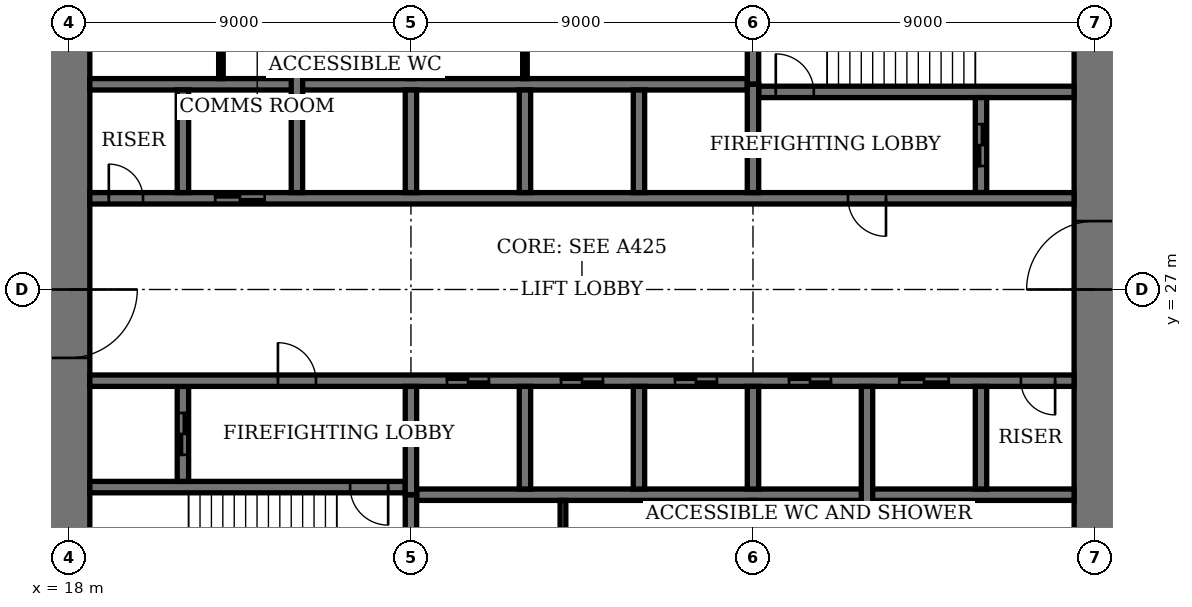
"""IFC4 building model, lengths in metres.
Left out: names, types, materials, properties, quantities, classifications, styles, units other than length and angle.
Written with IfcOpenShell. Run it as: python <this file> out.ifc"""

import sys

from ifc_helpers import new_model, si_unit, direction, frame, frame_2d, origin, place, context, subcontext, project, spatial, rectangle, extrude, element, fill, save


model = new_model("IFC4")
c1 = context("Model", 3, precision=1e-05, world=origin(), true_north=direction((0.0, 1.0)))
c2 = subcontext(c1, "Body", "Model", "MODEL_VIEW")
j1 = project(units=[si_unit("LENGTHUNIT", "METRE"), si_unit("PLANEANGLEUNIT", "RADIAN")], contexts=[c1])
p1 = place(None, origin())
s1 = spatial("IfcSite", under=j1, at=p1, CompositionType="ELEMENT")
p2 = place(p1, origin())
s2 = spatial("IfcBuilding", under=s1, at=p2, CompositionType="ELEMENT")
p3 = place(p2, frame((0.0, 0.0, 67.8)))
s3 = spatial("IfcBuildingStorey", under=s2, at=p3, CompositionType="ELEMENT", Elevation=67.8)
p4 = place(p3, frame((18.0, 35.45, 0.0), z_axis=(0.0, 0.0, 1.0), x_axis=(0.0, -1.0, 0.0)))
e1 = element("IfcWall", 1, at=p4, inside=s3, PredefinedType="SHEAR", context=c2, shape_type="SweptSolid", body=[
    extrude(rectangle(XDim=16.9, YDim=1.1, at=frame_2d((8.45, 0.0))), origin(), (0.0, 0.0, 1.0), 4.0),
])
p5 = place(p4, frame((8.45, 0.0, 0.0)))
e2 = element("IfcOpeningElement", 2, at=p5, cuts=e1, PredefinedType="OPENING", context=c2, shape_type="SweptSolid", body=[
    extrude(rectangle(XDim=1.8, YDim=2.4, at=frame_2d((0.9, 1.2))), frame((0.0, 0.56, 0.0), z_axis=(0.0, -1.0, 0.0), x_axis=(1.0, 0.0, 0.0)), (0.0, 0.0, 1.0), 1.12),
])
p6 = place(p3, frame((45.0, 18.55, 0.0), z_axis=(0.0, 0.0, 1.0), x_axis=(0.0, 1.0, 0.0)))
e3 = element("IfcWall", 3, at=p6, inside=s3, PredefinedType="SHEAR", context=c2, shape_type="SweptSolid", body=[
    extrude(rectangle(XDim=16.9, YDim=1.1, at=frame_2d((8.45, 0.0))), origin(), (0.0, 0.0, 1.0), 4.0),
])
p7 = place(p6, frame((8.45, 0.0, 0.0)))
e4 = element("IfcOpeningElement", 4, at=p7, cuts=e3, PredefinedType="OPENING", context=c2, shape_type="SweptSolid", body=[
    extrude(rectangle(XDim=1.8, YDim=2.4, at=frame_2d((0.9, 1.2))), frame((0.0, 0.56, 0.0), z_axis=(0.0, -1.0, 0.0), x_axis=(1.0, 0.0, 0.0)), (0.0, 0.0, 1.0), 1.12),
])
p8 = place(p3, frame((18.55, 21.8, 0.0), z_axis=(0.0, 0.0, 1.0), x_axis=(1.0, 0.0, 0.0)))
e5 = element("IfcWall", 5, at=p8, inside=s3, PredefinedType="SHEAR", context=c2, shape_type="SweptSolid", body=[
    extrude(rectangle(XDim=8.3, YDim=0.3, at=frame_2d((4.15, 0.0))), origin(), (0.0, 0.0, 1.0), 4.0),
])
p9 = place(p8, frame((6.85, 0.0, 0.0)))
e6 = element("IfcOpeningElement", 6, at=p9, cuts=e5, PredefinedType="OPENING", context=c2, shape_type="SweptSolid", body=[
    extrude(rectangle(XDim=1.0, YDim=2.4, at=frame_2d((0.5, 1.2))), frame((0.0, 0.16, 0.0), z_axis=(0.0, -1.0, 0.0), x_axis=(1.0, 0.0, 0.0)), (0.0, 0.0, 1.0), 0.32),
])
p10 = place(p3, frame((36.15, 32.2, 0.0), z_axis=(0.0, 0.0, 1.0), x_axis=(1.0, 0.0, 0.0)))
e7 = element("IfcWall", 7, at=p10, inside=s3, PredefinedType="SHEAR", context=c2, shape_type="SweptSolid", body=[
    extrude(rectangle(XDim=8.3, YDim=0.3, at=frame_2d((4.15, 0.0))), origin(), (0.0, 0.0, 1.0), 4.0),
])
p11 = place(p10, frame((0.45, 0.0, 0.0)))
e8 = element("IfcOpeningElement", 8, at=p11, cuts=e7, PredefinedType="OPENING", context=c2, shape_type="SweptSolid", body=[
    extrude(rectangle(XDim=1.0, YDim=2.4, at=frame_2d((0.5, 1.2))), frame((0.0, 0.16, 0.0), z_axis=(0.0, -1.0, 0.0), x_axis=(1.0, 0.0, 0.0)), (0.0, 0.0, 1.0), 0.32),
])
for number, where, z_axis, x_axis in (
    (9, (27.0, 18.55, 0.0), (0.0, 0.0, 1.0), (0.0, 1.0, 0.0)),
    (10, (36.0, 32.4, 0.0), (0.0, 0.0, 1.0), (0.0, 1.0, 0.0)),
):
    element("IfcWall", number, at=place(p3, frame(where, z_axis=z_axis, x_axis=x_axis)), inside=s3, PredefinedType="SHEAR", context=c2, shape_type="SweptSolid", body=[
        extrude(rectangle(XDim=3.05, YDim=0.3, at=frame_2d((1.525, 0.0))), origin(), (0.0, 0.0, 1.0), 4.0),
    ])
p12 = place(p3, frame((21.0, 21.95, 0.0), z_axis=(0.0, 0.0, 1.0), x_axis=(0.0, 1.0, 0.0)))
e11 = element("IfcWall", 11, at=p12, inside=s3, PredefinedType="SHEAR", context=c2, shape_type="SweptSolid", body=[
    extrude(rectangle(XDim=2.5, YDim=0.3, at=frame_2d((1.25, 0.0))), origin(), (0.0, 0.0, 1.0), 4.0),
])
p13 = place(p12, frame((0.7, 0.0, 0.0)))
e12 = element("IfcOpeningElement", 12, at=p13, cuts=e11, PredefinedType="OPENING", context=c2, shape_type="SweptSolid", body=[
    extrude(rectangle(XDim=1.1, YDim=2.4, at=frame_2d((0.55, 1.2))), frame((0.0, 0.16, 0.0), z_axis=(0.0, -1.0, 0.0), x_axis=(1.0, 0.0, 0.0)), (0.0, 0.0, 1.0), 0.32),
])
p14 = place(p3, frame((42.0, 29.55, 0.0), z_axis=(0.0, 0.0, 1.0), x_axis=(0.0, 1.0, 0.0)))
e13 = element("IfcWall", 13, at=p14, inside=s3, PredefinedType="SHEAR", context=c2, shape_type="SweptSolid", body=[
    extrude(rectangle(XDim=2.5, YDim=0.3, at=frame_2d((1.25, 0.0))), origin(), (0.0, 0.0, 1.0), 4.0),
])
p15 = place(p14, frame((0.7, 0.0, 0.0)))
e14 = element("IfcOpeningElement", 14, at=p15, cuts=e13, PredefinedType="OPENING", context=c2, shape_type="SweptSolid", body=[
    extrude(rectangle(XDim=1.1, YDim=2.4, at=frame_2d((0.55, 1.2))), frame((0.0, 0.16, 0.0), z_axis=(0.0, -1.0, 0.0), x_axis=(1.0, 0.0, 0.0)), (0.0, 0.0, 1.0), 0.32),
])
p16 = place(p3, frame((18.55, 24.6, 0.0), z_axis=(0.0, 0.0, 1.0), x_axis=(1.0, 0.0, 0.0)))
e15 = element("IfcWall", 15, at=p16, inside=s3, PredefinedType="SHEAR", context=c2, shape_type="SweptSolid", body=[
    extrude(rectangle(XDim=25.9, YDim=0.3, at=frame_2d((12.95, 0.0))), origin(), (0.0, 0.0, 1.0), 4.0),
])
p17 = place(p16, frame((4.95, 0.0, 0.0)))
e16 = element("IfcOpeningElement", 16, at=p17, cuts=e15, PredefinedType="OPENING", context=c2, shape_type="SweptSolid", body=[
    extrude(rectangle(XDim=1.0, YDim=2.4, at=frame_2d((0.5, 1.2))), frame((0.0, 0.16, 0.0), z_axis=(0.0, -1.0, 0.0), x_axis=(1.0, 0.0, 0.0)), (0.0, 0.0, 1.0), 0.32),
])
p18 = place(p16, frame((24.5, 0.0, 0.0)))
e17 = element("IfcOpeningElement", 17, at=p18, cuts=e15, PredefinedType="OPENING", context=c2, shape_type="SweptSolid", body=[
    extrude(rectangle(XDim=0.9, YDim=2.1, at=frame_2d((0.45, 1.05))), frame((0.0, 0.16, 0.0), z_axis=(0.0, -1.0, 0.0), x_axis=(1.0, 0.0, 0.0)), (0.0, 0.0, 1.0), 0.32),
])
p19 = place(p16, frame((9.4, 0.0, 0.0)))
e18 = element("IfcOpeningElement", 18, at=p19, cuts=e15, PredefinedType="OPENING", context=c2, shape_type="SweptSolid", body=[
    extrude(rectangle(XDim=1.1, YDim=2.4, at=frame_2d((0.55, 1.2))), frame((0.0, 0.16, 0.0), z_axis=(0.0, -1.0, 0.0), x_axis=(1.0, 0.0, 0.0)), (0.0, 0.0, 1.0), 0.32),
])
p20 = place(p16, frame((12.4, 0.0, 0.0)))
e19 = element("IfcOpeningElement", 19, at=p20, cuts=e15, PredefinedType="OPENING", context=c2, shape_type="SweptSolid", body=[
    extrude(rectangle(XDim=1.1, YDim=2.4, at=frame_2d((0.55, 1.2))), frame((0.0, 0.16, 0.0), z_axis=(0.0, -1.0, 0.0), x_axis=(1.0, 0.0, 0.0)), (0.0, 0.0, 1.0), 0.32),
])
p21 = place(p16, frame((15.4, 0.0, 0.0)))
e20 = element("IfcOpeningElement", 20, at=p21, cuts=e15, PredefinedType="OPENING", context=c2, shape_type="SweptSolid", body=[
    extrude(rectangle(XDim=1.1, YDim=2.4, at=frame_2d((0.55, 1.2))), frame((0.0, 0.16, 0.0), z_axis=(0.0, -1.0, 0.0), x_axis=(1.0, 0.0, 0.0)), (0.0, 0.0, 1.0), 0.32),
])
p22 = place(p16, frame((18.4, 0.0, 0.0)))
e21 = element("IfcOpeningElement", 21, at=p22, cuts=e15, PredefinedType="OPENING", context=c2, shape_type="SweptSolid", body=[
    extrude(rectangle(XDim=1.1, YDim=2.4, at=frame_2d((0.55, 1.2))), frame((0.0, 0.16, 0.0), z_axis=(0.0, -1.0, 0.0), x_axis=(1.0, 0.0, 0.0)), (0.0, 0.0, 1.0), 0.32),
])
p23 = place(p16, frame((21.3, 0.0, 0.0)))
e22 = element("IfcOpeningElement", 22, at=p23, cuts=e15, PredefinedType="OPENING", context=c2, shape_type="SweptSolid", body=[
    extrude(rectangle(XDim=1.3, YDim=2.4, at=frame_2d((0.65, 1.2))), frame((0.0, 0.16, 0.0), z_axis=(0.0, -1.0, 0.0), x_axis=(1.0, 0.0, 0.0)), (0.0, 0.0, 1.0), 0.32),
])
p24 = place(p3, frame((18.55, 29.4, 0.0), z_axis=(0.0, 0.0, 1.0), x_axis=(1.0, 0.0, 0.0)))
e23 = element("IfcWall", 23, at=p24, inside=s3, PredefinedType="SHEAR", context=c2, shape_type="SweptSolid", body=[
    extrude(rectangle(XDim=25.9, YDim=0.3, at=frame_2d((12.95, 0.0))), origin(), (0.0, 0.0, 1.0), 4.0),
])
p25 = place(p24, frame((19.95, 0.0, 0.0)))
e24 = element("IfcOpeningElement", 24, at=p25, cuts=e23, PredefinedType="OPENING", context=c2, shape_type="SweptSolid", body=[
    extrude(rectangle(XDim=1.0, YDim=2.4, at=frame_2d((0.5, 1.2))), frame((0.0, 0.16, 0.0), z_axis=(0.0, -1.0, 0.0), x_axis=(1.0, 0.0, 0.0)), (0.0, 0.0, 1.0), 0.32),
])
p26 = place(p24, frame((0.5, 0.0, 0.0)))
e25 = element("IfcOpeningElement", 25, at=p26, cuts=e23, PredefinedType="OPENING", context=c2, shape_type="SweptSolid", body=[
    extrude(rectangle(XDim=0.9, YDim=2.1, at=frame_2d((0.45, 1.05))), frame((0.0, 0.16, 0.0), z_axis=(0.0, -1.0, 0.0), x_axis=(1.0, 0.0, 0.0)), (0.0, 0.0, 1.0), 0.32),
])
p27 = place(p24, frame((3.3, 0.0, 0.0)))
e26 = element("IfcOpeningElement", 26, at=p27, cuts=e23, PredefinedType="OPENING", context=c2, shape_type="SweptSolid", body=[
    extrude(rectangle(XDim=1.3, YDim=2.4, at=frame_2d((0.65, 1.2))), frame((0.0, 0.16, 0.0), z_axis=(0.0, -1.0, 0.0), x_axis=(1.0, 0.0, 0.0)), (0.0, 0.0, 1.0), 0.32),
])
for number, where, z_axis, x_axis in (
    (27, (27.15, 21.6, 0.0), (0.0, 0.0, 1.0), (1.0, 0.0, 0.0)),
    (28, (18.55, 32.4, 0.0), (0.0, 0.0, 1.0), (1.0, 0.0, 0.0)),
):
    element("IfcWall", number, at=place(p3, frame(where, z_axis=z_axis, x_axis=x_axis)), inside=s3, PredefinedType="SHEAR", context=c2, shape_type="SweptSolid", body=[
        extrude(rectangle(XDim=17.3, YDim=0.3, at=frame_2d((8.65, 0.0))), origin(), (0.0, 0.0, 1.0), 4.0),
    ])
for number, where, z_axis, x_axis in (
    (29, (30.0, 21.75, 0.0), (0.0, 0.0, 1.0), (0.0, 1.0, 0.0)),
    (30, (33.0, 29.55, 0.0), (0.0, 0.0, 1.0), (0.0, 1.0, 0.0)),
    (31, (33.0, 21.75, 0.0), (0.0, 0.0, 1.0), (0.0, 1.0, 0.0)),
    (32, (30.0, 29.55, 0.0), (0.0, 0.0, 1.0), (0.0, 1.0, 0.0)),
    (33, (36.0, 21.75, 0.0), (0.0, 0.0, 1.0), (0.0, 1.0, 0.0)),
    (34, (27.0, 29.55, 0.0), (0.0, 0.0, 1.0), (0.0, 1.0, 0.0)),
):
    element("IfcWall", number, at=place(p3, frame(where, z_axis=z_axis, x_axis=x_axis)), inside=s3, PredefinedType="SHEAR", context=c2, shape_type="SweptSolid", body=[
        extrude(rectangle(XDim=2.7, YDim=0.3, at=frame_2d((1.35, 0.0))), origin(), (0.0, 0.0, 1.0), 4.0),
    ])
for number, where, z_axis, x_axis in (
    (35, (39.0, 18.55, 0.0), (0.0, 0.0, 1.0), (0.0, 1.0, 0.0)),
    (36, (24.0, 29.55, 0.0), (0.0, 0.0, 1.0), (0.0, 1.0, 0.0)),
):
    element("IfcWall", number, at=place(p3, frame(where, z_axis=z_axis, x_axis=x_axis)), inside=s3, PredefinedType="SHEAR", context=c2, shape_type="SweptSolid", body=[
        extrude(rectangle(XDim=5.9, YDim=0.3, at=frame_2d((2.95, 0.0))), origin(), (0.0, 0.0, 1.0), 4.0),
    ])
for number, where, z_axis, x_axis in (
    (37, (42.0, 21.75, 0.0), (0.0, 0.0, 1.0), (0.0, 1.0, 0.0)),
    (38, (21.0, 29.55, 0.0), (0.0, 0.0, 1.0), (0.0, 1.0, 0.0)),
):
    element("IfcWall", number, at=place(p3, frame(where, z_axis=z_axis, x_axis=x_axis)), inside=s3, PredefinedType="SHEAR", context=c2, shape_type="SweptSolid", body=[
        extrude(rectangle(XDim=2.7, YDim=0.3, at=frame_2d((1.35, 0.0))), origin(), (0.0, 0.0, 1.0), 4.0),
    ])
for number, where, z_axis, x_axis in (
    (39, (27.0, 21.6, 0.0), (0.0, 0.0, 1.0), (0.0, 1.0, 0.0)),
    (40, (36.0, 29.55, 0.0), (0.0, 0.0, 1.0), (0.0, 1.0, 0.0)),
):
    element("IfcWall", number, at=place(p3, frame(where, z_axis=z_axis, x_axis=x_axis)), inside=s3, PredefinedType="SHEAR", context=c2, shape_type="SweptSolid", body=[
        extrude(rectangle(XDim=2.85, YDim=0.3, at=frame_2d((1.425, 0.0))), origin(), (0.0, 0.0, 1.0), 4.0),
    ])
for number, where, z_axis, x_axis in (
    (41, (31.0, 18.55, 0.0), (0.0, 0.0, 1.0), (0.0, 1.0, 0.0)),
    (42, (36.0, 18.55, 0.0), (0.0, 0.0, 1.0), (0.0, 1.0, 0.0)),
):
    element("IfcWall", number, at=place(p3, frame(where, z_axis=z_axis, x_axis=x_axis)), inside=s3, PredefinedType="PARTITIONING", context=c2, shape_type="SweptSolid", body=[
        extrude(rectangle(XDim=2.9, YDim=0.15, at=frame_2d((1.45, 0.0))), origin(), (0.0, 0.0, 1.0), 3.75),
    ])
p28 = place(p3, frame((30.0, 32.55, 0.0), z_axis=(0.0, 0.0, 1.0), x_axis=(0.0, 1.0, 0.0)))
e43 = element("IfcWall", 43, at=p28, inside=s3, PredefinedType="PARTITIONING", context=c2, shape_type="SweptSolid", body=[
    extrude(rectangle(XDim=2.9, YDim=0.12, at=frame_2d((1.45, 0.0))), origin(), (0.0, 0.0, 1.0), 3.75),
])
p29 = place(p3, frame((27.0, 32.55, 0.0), z_axis=(0.0, 0.0, 1.0), x_axis=(0.0, 1.0, 0.0)))
e44 = element("IfcWall", 44, at=p29, inside=s3, PredefinedType="PARTITIONING", context=c2, shape_type="SweptSolid", body=[
    extrude(rectangle(XDim=2.9, YDim=0.15, at=frame_2d((1.45, 0.0))), origin(), (0.0, 0.0, 1.0), 3.75),
])
p30 = place(p3, frame((22.0, 32.55, 0.0), z_axis=(0.0, 0.0, 1.0), x_axis=(0.0, 1.0, 0.0)))
e45 = element("IfcWall", 45, at=p30, inside=s3, PredefinedType="PARTITIONING", context=c2, shape_type="SweptSolid", body=[
    extrude(rectangle(XDim=2.9, YDim=0.12, at=frame_2d((1.45, 0.0))), origin(), (0.0, 0.0, 1.0), 3.75),
])
p31 = place(p30, frame((0.95, 0.0, 0.0)))
e46 = element("IfcOpeningElement", 46, at=p31, cuts=e45, PredefinedType="OPENING", context=c2, shape_type="SweptSolid", body=[
    extrude(rectangle(XDim=1.0, YDim=2.4, at=frame_2d((0.5, 1.2))), frame((0.0, 0.07, 0.0), z_axis=(0.0, -1.0, 0.0), x_axis=(1.0, 0.0, 0.0)), (0.0, 0.0, 1.0), 0.14),
])
p32 = place(p5, origin())
e47 = element("IfcDoor", 47, at=p32, inside=s3, OperationType="DOUBLE_DOOR_DOUBLE_SWING", PredefinedType="DOOR", context=c2, shape_type="SweptSolid", body=[
    extrude(rectangle(XDim=1.8, YDim=2.4, at=frame_2d((0.9, 1.2))), frame((0.0, 0.03, 0.0), z_axis=(0.0, -1.0, 0.0), x_axis=(1.0, 0.0, 0.0)), (0.0, 0.0, 1.0), 0.06),
    extrude(rectangle(XDim=0.04, YDim=2.4, at=frame_2d((0.02, 1.2))), frame((0.0, 0.55, 0.0), z_axis=(0.0, -1.0, 0.0), x_axis=(1.0, 0.0, 0.0)), (0.0, 0.0, 1.0), 1.1),
    extrude(rectangle(XDim=0.04, YDim=2.4, at=frame_2d((1.78, 1.2))), frame((0.0, 0.55, 0.0), z_axis=(0.0, -1.0, 0.0), x_axis=(1.0, 0.0, 0.0)), (0.0, 0.0, 1.0), 1.1),
    extrude(rectangle(XDim=1.8, YDim=0.04, at=frame_2d((0.9, 2.38))), frame((0.0, 0.55, 0.0), z_axis=(0.0, -1.0, 0.0), x_axis=(1.0, 0.0, 0.0)), (0.0, 0.0, 1.0), 1.1),
])
fill(e2, e47)
p33 = place(p7, origin())
e48 = element("IfcDoor", 48, at=p33, inside=s3, OperationType="DOUBLE_DOOR_DOUBLE_SWING", PredefinedType="DOOR", context=c2, shape_type="SweptSolid", body=[
    extrude(rectangle(XDim=1.8, YDim=2.4, at=frame_2d((0.9, 1.2))), frame((0.0, 0.03, 0.0), z_axis=(0.0, -1.0, 0.0), x_axis=(1.0, 0.0, 0.0)), (0.0, 0.0, 1.0), 0.06),
    extrude(rectangle(XDim=0.04, YDim=2.4, at=frame_2d((0.02, 1.2))), frame((0.0, 0.55, 0.0), z_axis=(0.0, -1.0, 0.0), x_axis=(1.0, 0.0, 0.0)), (0.0, 0.0, 1.0), 1.1),
    extrude(rectangle(XDim=0.04, YDim=2.4, at=frame_2d((1.78, 1.2))), frame((0.0, 0.55, 0.0), z_axis=(0.0, -1.0, 0.0), x_axis=(1.0, 0.0, 0.0)), (0.0, 0.0, 1.0), 1.1),
    extrude(rectangle(XDim=1.8, YDim=0.04, at=frame_2d((0.9, 2.38))), frame((0.0, 0.55, 0.0), z_axis=(0.0, -1.0, 0.0), x_axis=(1.0, 0.0, 0.0)), (0.0, 0.0, 1.0), 1.1),
])
fill(e4, e48)
p34 = place(p9, origin())
e49 = element("IfcDoor", 49, at=p34, inside=s3, OperationType="SINGLE_SWING_RIGHT", PredefinedType="DOOR", context=c2, shape_type="SweptSolid", body=[
    extrude(rectangle(XDim=1.0, YDim=2.4, at=frame_2d((0.5, 1.2))), frame((0.0, 0.03, 0.0), z_axis=(0.0, -1.0, 0.0), x_axis=(1.0, 0.0, 0.0)), (0.0, 0.0, 1.0), 0.06),
])
fill(e6, e49)
p35 = place(p11, origin())
e50 = element("IfcDoor", 50, at=p35, inside=s3, OperationType="SINGLE_SWING_RIGHT", PredefinedType="DOOR", context=c2, shape_type="SweptSolid", body=[
    extrude(rectangle(XDim=1.0, YDim=2.4, at=frame_2d((0.5, 1.2))), frame((0.0, 0.03, 0.0), z_axis=(0.0, -1.0, 0.0), x_axis=(1.0, 0.0, 0.0)), (0.0, 0.0, 1.0), 0.06),
])
fill(e8, e50)
p36 = place(p17, origin())
e51 = element("IfcDoor", 51, at=p36, inside=s3, OperationType="SINGLE_SWING_RIGHT", PredefinedType="DOOR", context=c2, shape_type="SweptSolid", body=[
    extrude(rectangle(XDim=1.0, YDim=2.4, at=frame_2d((0.5, 1.2))), frame((0.0, 0.03, 0.0), z_axis=(0.0, -1.0, 0.0), x_axis=(1.0, 0.0, 0.0)), (0.0, 0.0, 1.0), 0.06),
])
fill(e16, e51)
p37 = place(p25, origin())
e52 = element("IfcDoor", 52, at=p37, inside=s3, OperationType="SINGLE_SWING_RIGHT", PredefinedType="DOOR", context=c2, shape_type="SweptSolid", body=[
    extrude(rectangle(XDim=1.0, YDim=2.4, at=frame_2d((0.5, 1.2))), frame((0.0, 0.03, 0.0), z_axis=(0.0, -1.0, 0.0), x_axis=(1.0, 0.0, 0.0)), (0.0, 0.0, 1.0), 0.06),
])
fill(e24, e52)
p38 = place(p18, origin())
e53 = element("IfcDoor", 53, at=p38, inside=s3, OperationType="SINGLE_SWING_RIGHT", PredefinedType="DOOR", context=c2, shape_type="SweptSolid", body=[
    extrude(rectangle(XDim=0.9, YDim=2.1, at=frame_2d((0.45, 1.05))), frame((0.0, 0.03, 0.0), z_axis=(0.0, -1.0, 0.0), x_axis=(1.0, 0.0, 0.0)), (0.0, 0.0, 1.0), 0.06),
])
fill(e17, e53)
p39 = place(p26, origin())
e54 = element("IfcDoor", 54, at=p39, inside=s3, OperationType="SINGLE_SWING_RIGHT", PredefinedType="DOOR", context=c2, shape_type="SweptSolid", body=[
    extrude(rectangle(XDim=0.9, YDim=2.1, at=frame_2d((0.45, 1.05))), frame((0.0, 0.03, 0.0), z_axis=(0.0, -1.0, 0.0), x_axis=(1.0, 0.0, 0.0)), (0.0, 0.0, 1.0), 0.06),
])
fill(e25, e54)
p40 = place(p19, origin())
e55 = element("IfcDoor", 55, at=p40, inside=s3, OperationType="DOUBLE_DOOR_SLIDING", PredefinedType="DOOR", context=c2, shape_type="SweptSolid", body=[
    extrude(rectangle(XDim=1.1, YDim=2.4, at=frame_2d((0.55, 1.2))), frame((0.0, 0.02, 0.0), z_axis=(0.0, -1.0, 0.0), x_axis=(1.0, 0.0, 0.0)), (0.0, 0.0, 1.0), 0.04),
])
fill(e18, e55)
p41 = place(p20, origin())
e56 = element("IfcDoor", 56, at=p41, inside=s3, OperationType="DOUBLE_DOOR_SLIDING", PredefinedType="DOOR", context=c2, shape_type="SweptSolid", body=[
    extrude(rectangle(XDim=1.1, YDim=2.4, at=frame_2d((0.55, 1.2))), frame((0.0, 0.02, 0.0), z_axis=(0.0, -1.0, 0.0), x_axis=(1.0, 0.0, 0.0)), (0.0, 0.0, 1.0), 0.04),
])
fill(e19, e56)
p42 = place(p21, origin())
e57 = element("IfcDoor", 57, at=p42, inside=s3, OperationType="DOUBLE_DOOR_SLIDING", PredefinedType="DOOR", context=c2, shape_type="SweptSolid", body=[
    extrude(rectangle(XDim=1.1, YDim=2.4, at=frame_2d((0.55, 1.2))), frame((0.0, 0.02, 0.0), z_axis=(0.0, -1.0, 0.0), x_axis=(1.0, 0.0, 0.0)), (0.0, 0.0, 1.0), 0.04),
])
fill(e20, e57)
p43 = place(p22, origin())
e58 = element("IfcDoor", 58, at=p43, inside=s3, OperationType="DOUBLE_DOOR_SLIDING", PredefinedType="DOOR", context=c2, shape_type="SweptSolid", body=[
    extrude(rectangle(XDim=1.1, YDim=2.4, at=frame_2d((0.55, 1.2))), frame((0.0, 0.02, 0.0), z_axis=(0.0, -1.0, 0.0), x_axis=(1.0, 0.0, 0.0)), (0.0, 0.0, 1.0), 0.04),
])
fill(e21, e58)
p44 = place(p23, origin())
e59 = element("IfcDoor", 59, at=p44, inside=s3, OperationType="DOUBLE_DOOR_SLIDING", PredefinedType="DOOR", context=c2, shape_type="SweptSolid", body=[
    extrude(rectangle(XDim=1.3, YDim=2.4, at=frame_2d((0.65, 1.2))), frame((0.0, 0.02, 0.0), z_axis=(0.0, -1.0, 0.0), x_axis=(1.0, 0.0, 0.0)), (0.0, 0.0, 1.0), 0.04),
])
fill(e22, e59)
p45 = place(p27, origin())
e60 = element("IfcDoor", 60, at=p45, inside=s3, OperationType="DOUBLE_DOOR_SLIDING", PredefinedType="DOOR", context=c2, shape_type="SweptSolid", body=[
    extrude(rectangle(XDim=1.3, YDim=2.4, at=frame_2d((0.65, 1.2))), frame((0.0, 0.02, 0.0), z_axis=(0.0, -1.0, 0.0), x_axis=(1.0, 0.0, 0.0)), (0.0, 0.0, 1.0), 0.04),
])
fill(e26, e60)
p46 = place(p13, origin())
e61 = element("IfcDoor", 61, at=p46, inside=s3, OperationType="DOUBLE_DOOR_SLIDING", PredefinedType="DOOR", context=c2, shape_type="SweptSolid", body=[
    extrude(rectangle(XDim=1.1, YDim=2.4, at=frame_2d((0.55, 1.2))), frame((0.0, 0.03, 0.0), z_axis=(0.0, -1.0, 0.0), x_axis=(1.0, 0.0, 0.0)), (0.0, 0.0, 1.0), 0.06),
])
fill(e12, e61)
p47 = place(p15, origin())
e62 = element("IfcDoor", 62, at=p47, inside=s3, OperationType="DOUBLE_DOOR_SLIDING", PredefinedType="DOOR", context=c2, shape_type="SweptSolid", body=[
    extrude(rectangle(XDim=1.1, YDim=2.4, at=frame_2d((0.55, 1.2))), frame((0.0, 0.03, 0.0), z_axis=(0.0, -1.0, 0.0), x_axis=(1.0, 0.0, 0.0)), (0.0, 0.0, 1.0), 0.06),
])
fill(e14, e62)
save(model, sys.argv[1])
